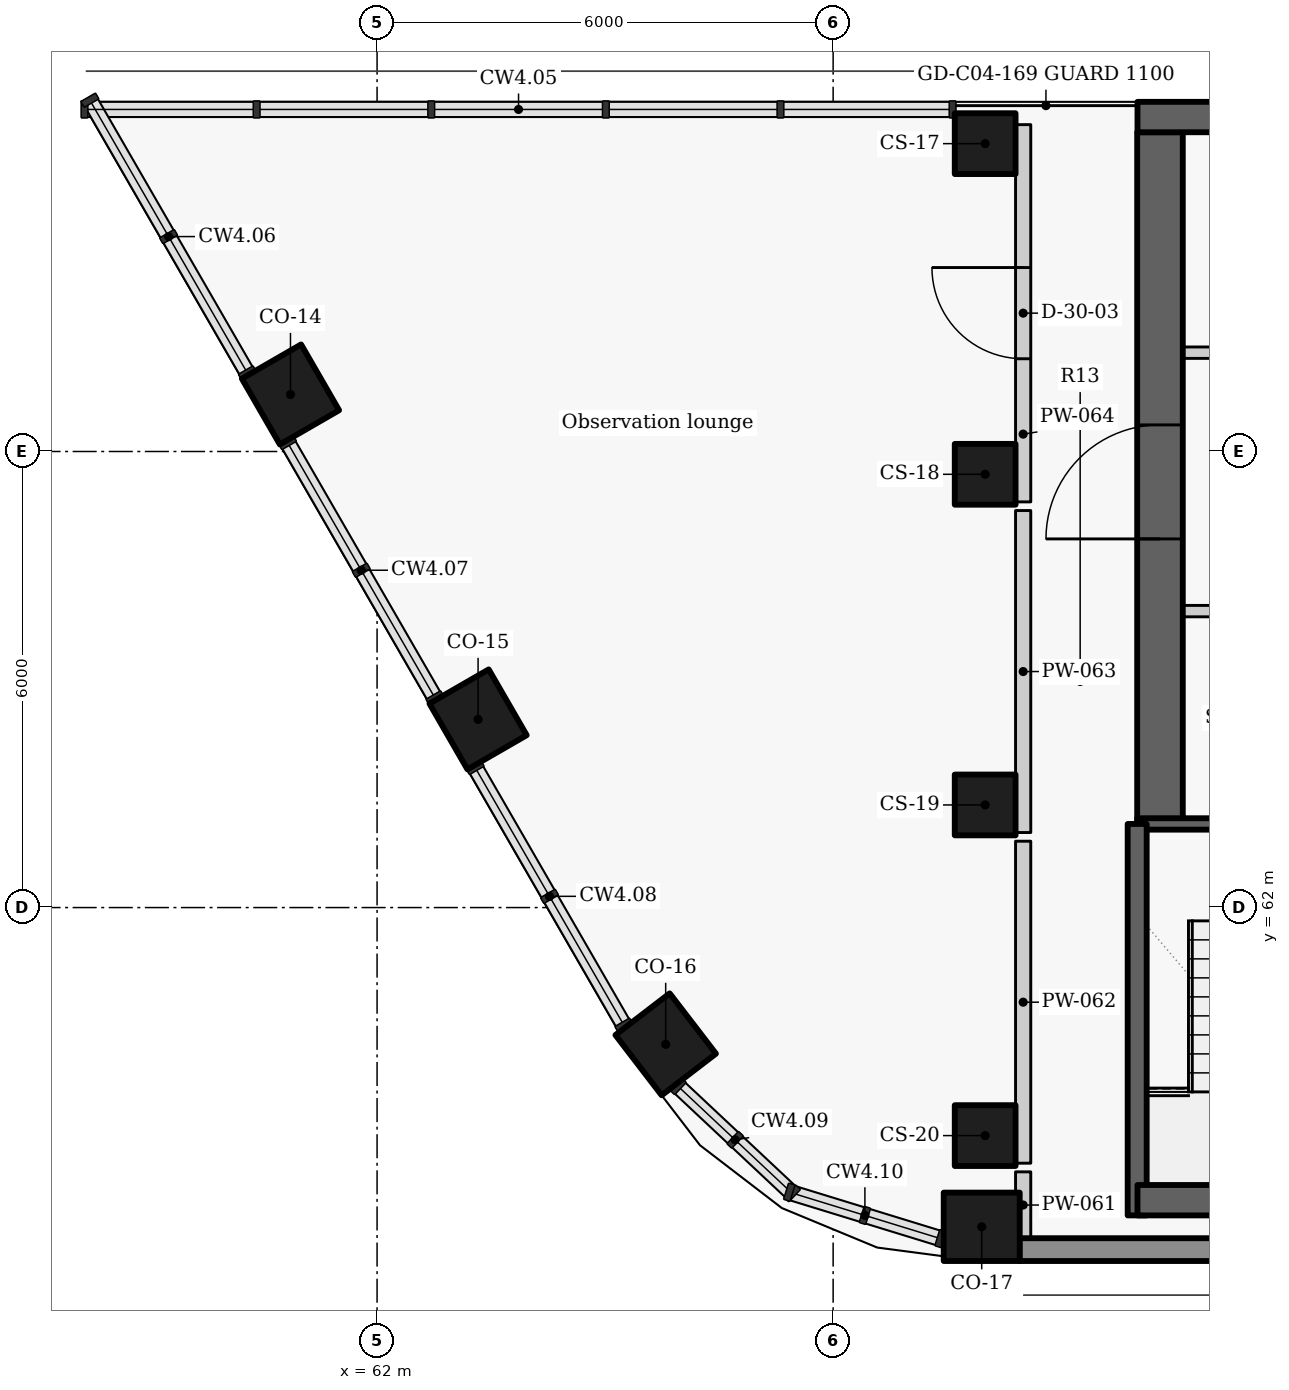
"""IFC4 building model, lengths in metres.
Left out: names, types, materials, properties, quantities, classifications, styles, units other than length and angle.
Written with IfcOpenShell. Run it as: python <this file> out.ifc"""

import sys

from ifc_helpers import new_model, si_unit, direction, frame, frame_2d, origin, origin_2d, place, context, subcontext, project, spatial, rectangle, extrude, element, fill, save


model = new_model("IFC4")
c1 = context("Model", 3, precision=1e-05, world=origin(), true_north=direction((0.0, 1.0)))
c2 = subcontext(c1, "Body", "Model", "MODEL_VIEW")
j1 = project(units=[si_unit("LENGTHUNIT", "METRE"), si_unit("PLANEANGLEUNIT", "RADIAN")], contexts=[c1])
p1 = place(None, origin())
s1 = spatial("IfcSite", under=j1, at=p1, CompositionType="ELEMENT")
p2 = place(p1, origin())
s2 = spatial("IfcBuilding", under=s1, at=p2, CompositionType="ELEMENT")
p3 = place(p2, frame((0.0, 0.0, 283.2)))
s3 = spatial("IfcBuildingStorey", under=s2, at=p3, CompositionType="ELEMENT", Elevation=283.2)
for number, where, z_axis, x_axis in (
    (1, (60.861, 68.75, 0.0), (0.0, 0.0, 1.0), (0.5, -0.866, 0.0)),
    (2, (63.329, 64.475, 0.0), (0.0, 0.0, 1.0), (0.5, -0.866, 0.0)),
    (3, (65.797, 60.2, 0.0), (0.0, 0.0, 1.0), (0.609, -0.793, 0.0)),
    (4, (69.955, 57.8, 0.0), (0.0, 0.0, 1.0), (1.0, 0.0, 0.0)),
):
    element("IfcColumn", number, at=place(p3, frame(where, z_axis=z_axis, x_axis=x_axis)), inside=s3, PredefinedType="COLUMN", context=c2, shape_type="SweptSolid", body=[
        extrude(rectangle(XDim=1.0, YDim=0.9, at=origin_2d()), origin(), (0.0, 0.0, 1.0), 3.6),
    ])
for number, where, z_axis, x_axis in (
    (5, (70.0, 72.05, 0.0), (0.0, 0.0, 1.0), (0.0, -1.0, 0.0)),
    (6, (70.0, 67.7, 0.0), (0.0, 0.0, 1.0), (0.0, -1.0, 0.0)),
    (7, (70.0, 63.35, 0.0), (0.0, 0.0, 1.0), (0.0, -1.0, 0.0)),
    (8, (70.0, 59.0, 0.0), (0.0, 0.0, 1.0), (0.0, -1.0, 0.0)),
):
    element("IfcColumn", number, at=place(p3, frame(where, z_axis=z_axis, x_axis=x_axis)), inside=s3, PredefinedType="COLUMN", context=c2, shape_type="SweptSolid", body=[
        extrude(rectangle(XDim=0.8, YDim=0.8, at=origin_2d()), origin(), (0.0, 0.0, 1.0), 3.6),
    ])
p4 = place(p3, frame((70.451, 57.5, 0.0), z_axis=(0.0, 0.0, 1.0), x_axis=(1.0, 0.0, 0.0)))
e9 = element("IfcWall", 9, at=p4, inside=s3, PredefinedType="SOLIDWALL", context=c2, shape_type="SweptSolid", body=[
    extrude(rectangle(XDim=19.093, YDim=0.3, at=frame_2d((9.546, 0.0))), origin(), (0.0, 0.0, 1.0), 2.725),
])
p5 = place(p3, frame((72.0, 69.3, 0.0), z_axis=(0.0, 0.0, 1.0), x_axis=(1.0, 0.0, 0.0)))
e10 = element("IfcWall", 10, at=p5, inside=s3, PredefinedType="PARTITIONING", context=c2, shape_type="SweptSolid", body=[
    extrude(rectangle(XDim=13.4, YDim=0.15, at=frame_2d((6.7, 0.0))), origin(), (0.0, 0.0, 1.0), 3.325),
])
p6 = place(p5, frame((1.175, 0.0, 0.0)))
e11 = element("IfcOpeningElement", 11, at=p6, cuts=e10, PredefinedType="OPENING", context=c2, shape_type="SweptSolid", body=[
    extrude(rectangle(XDim=0.9, YDim=2.1, at=frame_2d((0.45, 1.05))), frame((0.0, 0.085, 0.0), z_axis=(0.0, -1.0, 0.0), x_axis=(1.0, 0.0, 0.0)), (0.0, 0.0, 1.0), 0.17),
])
p7 = place(p5, frame((3.5, 0.0, 0.0)))
e12 = element("IfcOpeningElement", 12, at=p7, cuts=e10, PredefinedType="OPENING", context=c2, shape_type="SweptSolid", body=[
    extrude(rectangle(XDim=0.9, YDim=2.1, at=frame_2d((0.45, 1.05))), frame((0.0, 0.085, 0.0), z_axis=(0.0, -1.0, 0.0), x_axis=(1.0, 0.0, 0.0)), (0.0, 0.0, 1.0), 0.17),
])
p8 = place(p5, frame((8.9, 0.0, 0.0)))
e13 = element("IfcOpeningElement", 13, at=p8, cuts=e10, PredefinedType="OPENING", context=c2, shape_type="SweptSolid", body=[
    extrude(rectangle(XDim=0.9, YDim=2.1, at=frame_2d((0.45, 1.05))), frame((0.0, 0.085, 0.0), z_axis=(0.0, -1.0, 0.0), x_axis=(1.0, 0.0, 0.0)), (0.0, 0.0, 1.0), 0.17),
])
p9 = place(p3, frame((72.3, 63.1, -0.275), z_axis=(0.0, 0.0, 1.0), x_axis=(0.0, 1.0, 0.0)))
e14 = element("IfcWall", 14, at=p9, inside=s3, PredefinedType="SHEAR", context=c2, shape_type="SweptSolid", body=[
    extrude(rectangle(XDim=9.1, YDim=0.6, at=frame_2d((4.55, 0.0))), origin(), (0.0, 0.0, 1.0), 3.6),
])
p10 = place(p9, frame((3.75, 0.0, 0.275)))
e15 = element("IfcOpeningElement", 15, at=p10, cuts=e14, PredefinedType="OPENING", context=c2, shape_type="SweptSolid", body=[
    extrude(rectangle(XDim=1.5, YDim=2.1, at=frame_2d((0.75, 1.05))), frame((0.0, 0.31, 0.0), z_axis=(0.0, -1.0, 0.0), x_axis=(1.0, 0.0, 0.0)), (0.0, 0.0, 1.0), 0.62),
])
p11 = place(p3, frame((82.703, 65.9, 0.0), z_axis=(0.0, 0.0, 1.0), x_axis=(-1.0, 0.0, 0.0)))
e16 = element("IfcWall", 16, at=p11, inside=s3, PredefinedType="PARTITIONING", context=c2, shape_type="SweptSolid", body=[
    extrude(rectangle(XDim=10.703, YDim=0.15, at=frame_2d((5.352, 0.0))), origin(), (0.0, 0.0, 1.0), 3.325),
])
p12 = place(p11, frame((8.528, 0.0, 0.0)))
e17 = element("IfcOpeningElement", 17, at=p12, cuts=e16, PredefinedType="OPENING", context=c2, shape_type="SweptSolid", body=[
    extrude(rectangle(XDim=1.1, YDim=2.1, at=frame_2d((0.55, 1.05))), frame((0.0, 0.085, 0.0), z_axis=(0.0, -1.0, 0.0), x_axis=(1.0, 0.0, 0.0)), (0.0, 0.0, 1.0), 0.17),
])
p13 = place(p11, frame((6.978, 0.0, 0.0)))
e18 = element("IfcOpeningElement", 18, at=p13, cuts=e16, PredefinedType="OPENING", context=c2, shape_type="SweptSolid", body=[
    extrude(rectangle(XDim=0.9, YDim=2.1, at=frame_2d((0.45, 1.05))), frame((0.0, 0.085, 0.0), z_axis=(0.0, -1.0, 0.0), x_axis=(1.0, 0.0, 0.0)), (0.0, 0.0, 1.0), 0.17),
])
p14 = place(p11, frame((5.628, 0.0, 0.0)))
e19 = element("IfcOpeningElement", 19, at=p14, cuts=e16, PredefinedType="OPENING", context=c2, shape_type="SweptSolid", body=[
    extrude(rectangle(XDim=0.9, YDim=2.1, at=frame_2d((0.45, 1.05))), frame((0.0, 0.085, 0.0), z_axis=(0.0, -1.0, 0.0), x_axis=(1.0, 0.0, 0.0)), (0.0, 0.0, 1.0), 0.17),
])
p15 = place(p11, frame((3.453, 0.0, 0.0)))
e20 = element("IfcOpeningElement", 20, at=p15, cuts=e16, PredefinedType="OPENING", context=c2, shape_type="SweptSolid", body=[
    extrude(rectangle(XDim=1.2, YDim=2.1, at=frame_2d((0.6, 1.05))), frame((0.0, 0.085, 0.0), z_axis=(0.0, -1.0, 0.0), x_axis=(1.0, 0.0, 0.0)), (0.0, 0.0, 1.0), 0.17),
])
p16 = place(p11, frame((0.903, 0.0, 0.0)))
e21 = element("IfcOpeningElement", 21, at=p16, cuts=e16, PredefinedType="OPENING", context=c2, shape_type="SweptSolid", body=[
    extrude(rectangle(XDim=0.9, YDim=2.1, at=frame_2d((0.45, 1.05))), frame((0.0, 0.085, 0.0), z_axis=(0.0, -1.0, 0.0), x_axis=(1.0, 0.0, 0.0)), (0.0, 0.0, 1.0), 0.17),
])
p17 = place(p3, frame((72.0, 63.1, -0.275), z_axis=(0.0, 0.0, 1.0), x_axis=(1.0, 0.0, 0.0)))
e22 = element("IfcWall", 22, at=p17, inside=s3, PredefinedType="SHEAR", context=c2, shape_type="SweptSolid", body=[
    extrude(rectangle(XDim=2.6, YDim=0.15, at=frame_2d((1.3, 0.0))), origin(), (0.0, 0.0, 1.0), 3.6),
])
p18 = place(p17, frame((1.02, 0.0, 0.275)))
e23 = element("IfcOpeningElement", 23, at=p18, cuts=e22, PredefinedType="OPENING", context=c2, shape_type="SweptSolid", body=[
    extrude(rectangle(XDim=1.1, YDim=2.1, at=frame_2d((0.55, 1.05))), frame((0.0, 0.085, 0.0), z_axis=(0.0, -1.0, 0.0), x_axis=(1.0, 0.0, 0.0)), (0.0, 0.0, 1.0), 0.17),
])
p19 = place(p3, frame((72.0, 57.95, -0.275), z_axis=(0.0, 0.0, 1.0), x_axis=(0.0, 1.0, 0.0)))
e24 = element("IfcWall", 24, at=p19, inside=s3, PredefinedType="SHEAR", context=c2, shape_type="SweptSolid", body=[
    extrude(rectangle(XDim=5.15, YDim=0.25, at=frame_2d((2.575, 0.0))), origin(), (0.0, 0.0, 1.0), 3.6),
])
p20 = place(p3, frame((70.5, 57.65, 0.0), z_axis=(0.0, 0.0, 1.0), x_axis=(0.0, 1.0, 0.0)))
e25 = element("IfcWall", 25, at=p20, inside=s3, PredefinedType="PARTITIONING", context=c2, shape_type="SweptSolid", body=[
    extrude(rectangle(XDim=0.873, YDim=0.2, at=frame_2d((0.437, 0.0))), origin(), (0.0, 0.0, 1.0), 3.325),
])
p21 = place(p3, frame((70.5, 58.637, 0.0), z_axis=(0.0, 0.0, 1.0), x_axis=(0.0, 1.0, 0.0)))
e26 = element("IfcWall", 26, at=p21, inside=s3, PredefinedType="PARTITIONING", context=c2, shape_type="SweptSolid", body=[
    extrude(rectangle(XDim=4.236, YDim=0.2, at=frame_2d((2.118, 0.0))), origin(), (0.0, 0.0, 1.0), 3.325),
])
p22 = place(p3, frame((70.5, 62.987, 0.0), z_axis=(0.0, 0.0, 1.0), x_axis=(0.0, 1.0, 0.0)))
e27 = element("IfcWall", 27, at=p22, inside=s3, PredefinedType="PARTITIONING", context=c2, shape_type="SweptSolid", body=[
    extrude(rectangle(XDim=4.236, YDim=0.2, at=frame_2d((2.118, 0.0))), origin(), (0.0, 0.0, 1.0), 3.325),
])
p23 = place(p3, frame((70.5, 67.337, 0.0), z_axis=(0.0, 0.0, 1.0), x_axis=(0.0, 1.0, 0.0)))
e28 = element("IfcWall", 28, at=p23, inside=s3, PredefinedType="PARTITIONING", context=c2, shape_type="SweptSolid", body=[
    extrude(rectangle(XDim=4.963, YDim=0.2, at=frame_2d((2.481, 0.0))), origin(), (0.0, 0.0, 1.0), 3.325),
])
p24 = place(p23, frame((1.883, 0.0, 0.0)))
e29 = element("IfcOpeningElement", 29, at=p24, cuts=e28, PredefinedType="OPENING", context=c2, shape_type="SweptSolid", body=[
    extrude(rectangle(XDim=1.2, YDim=2.1, at=frame_2d((0.6, 1.05))), frame((0.0, 0.11, 0.0), z_axis=(0.0, -1.0, 0.0), x_axis=(1.0, 0.0, 0.0)), (0.0, 0.0, 1.0), 0.22),
])
p25 = place(p3, frame((72.004, 72.4, -0.275), z_axis=(0.0, 0.0, 1.0), x_axis=(1.0, 0.0, 0.0)))
e30 = element("IfcWall", 30, at=p25, inside=s3, PredefinedType="SHEAR", context=c2, shape_type="SweptSolid", body=[
    extrude(rectangle(XDim=13.396, YDim=0.4, at=frame_2d((6.698, 0.0))), origin(), (0.0, 0.0, 1.0), 3.6),
])
p26 = place(p3, frame((72.004, 58.15, -0.275), z_axis=(0.0, 0.0, 1.0), x_axis=(1.0, 0.0, 0.0)))
e31 = element("IfcWall", 31, at=p26, inside=s3, PredefinedType="SHEAR", context=c2, shape_type="SweptSolid", body=[
    extrude(rectangle(XDim=15.992, YDim=0.4, at=frame_2d((7.996, 0.0))), origin(), (0.0, 0.0, 1.0), 3.6),
])
p27 = place(p24, origin())
e32 = element("IfcDoor", 32, at=p27, inside=s3, OperationType="SINGLE_SWING_RIGHT", PredefinedType="DOOR", context=c2, shape_type="SweptSolid", body=[
    extrude(rectangle(XDim=1.2, YDim=2.1, at=frame_2d((0.6, 1.05))), frame((0.0, 0.025, 0.0), z_axis=(0.0, -1.0, 0.0), x_axis=(1.0, 0.0, 0.0)), (0.0, 0.0, 1.0), 0.05),
])
fill(e29, e32)
p28 = place(p10, origin())
e33 = element("IfcDoor", 33, at=p28, inside=s3, OperationType="DOUBLE_DOOR_SINGLE_SWING", PredefinedType="DOOR", context=c2, shape_type="SweptSolid", body=[
    extrude(rectangle(XDim=1.5, YDim=2.1, at=frame_2d((0.75, 1.05))), frame((0.0, 0.025, 0.0), z_axis=(0.0, -1.0, 0.0), x_axis=(1.0, 0.0, 0.0)), (0.0, 0.0, 1.0), 0.05),
])
fill(e15, e33)
save(model, sys.argv[1])
